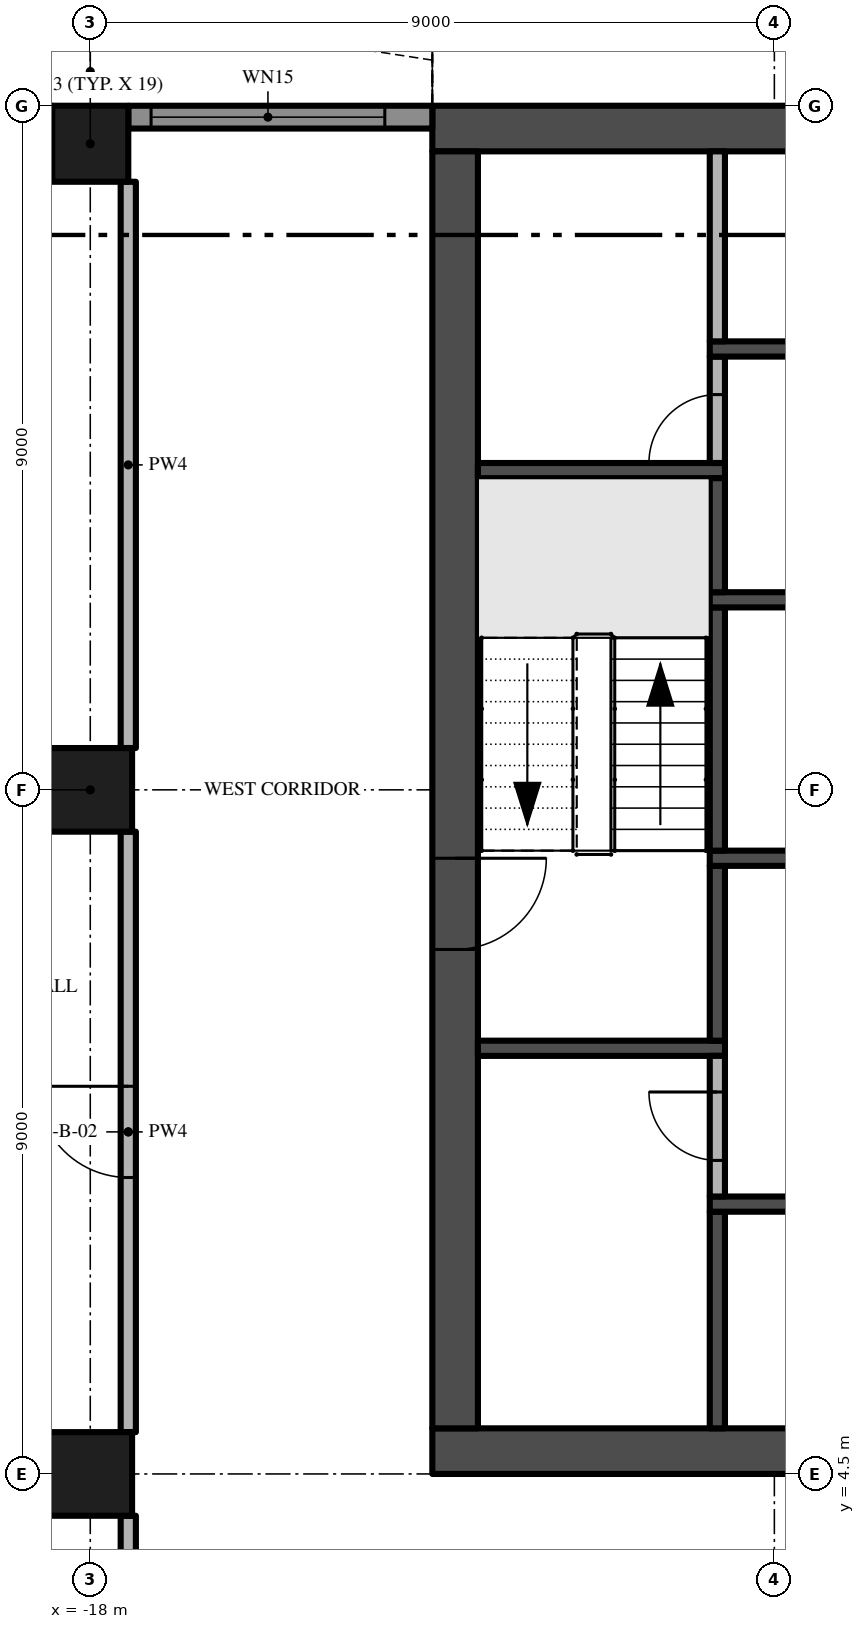
"""IFC4 building model, lengths in metres.
Left out: names, types, materials, properties, quantities, classifications, styles, units other than length and angle.
Written with IfcOpenShell. Run it as: python <this file> out.ifc"""

import sys

from ifc_helpers import new_model, si_unit, direction, frame, frame_2d, origin, origin_2d, place, context, subcontext, project, spatial, polyline, rectangle, outline, extrude, element, fill, save


model = new_model("IFC4")
c1 = context("Model", 3, precision=1e-05, world=origin(), true_north=direction((0.0, 1.0)))
c2 = subcontext(c1, "Body", "Model", "MODEL_VIEW")
j1 = project(units=[si_unit("LENGTHUNIT", "METRE"), si_unit("PLANEANGLEUNIT", "RADIAN")], contexts=[c1])
p1 = place(None, origin())
s1 = spatial("IfcSite", under=j1, at=p1, CompositionType="ELEMENT")
p2 = place(p1, origin())
s2 = spatial("IfcBuilding", under=s1, at=p2, CompositionType="ELEMENT")
p3 = place(p2, frame((0.0, 0.0, 203.4)))
s3 = spatial("IfcBuildingStorey", under=s2, at=p3, CompositionType="ELEMENT", Elevation=203.4)
p4 = place(p3, frame((-13.5, 4.8, -0.3), z_axis=(0.0, 0.0, 1.0), x_axis=(1.0, 0.0, 0.0)))
e1 = element("IfcWall", 1, at=p4, inside=s3, PredefinedType="SHEAR", context=c2, shape_type="SweptSolid", body=[
    extrude(rectangle(XDim=27.0, YDim=0.6, at=frame_2d((13.5, 0.0))), origin(), (0.0, 0.0, 1.0), 3.8),
])
p5 = place(p4, frame((12.0, 0.0, 0.3)))
e2 = element("IfcOpeningElement", 2, at=p5, cuts=e1, PredefinedType="OPENING", context=c2, shape_type="SweptSolid", body=[
    extrude(rectangle(XDim=3.0, YDim=2.4, at=frame_2d((1.5, 1.2))), frame((0.0, 0.31, 0.0), z_axis=(0.0, -1.0, 0.0), x_axis=(1.0, 0.0, 0.0)), (0.0, 0.0, 1.0), 0.62),
])
p6 = place(p4, frame((4.9, 0.0, 0.3)))
e3 = element("IfcOpeningElement", 3, at=p6, cuts=e1, PredefinedType="OPENING", context=c2, shape_type="SweptSolid", body=[
    extrude(rectangle(XDim=1.2, YDim=2.2, at=frame_2d((0.6, 1.1))), frame((0.0, 0.31, 0.0), z_axis=(0.0, -1.0, 0.0), x_axis=(1.0, 0.0, 0.0)), (0.0, 0.0, 1.0), 0.62),
])
p7 = place(p4, frame((20.75, 0.0, 0.3)))
e4 = element("IfcOpeningElement", 4, at=p7, cuts=e1, PredefinedType="OPENING", context=c2, shape_type="SweptSolid", body=[
    extrude(rectangle(XDim=1.5, YDim=2.2, at=frame_2d((0.75, 1.1))), frame((0.0, 0.31, 0.0), z_axis=(0.0, -1.0, 0.0), x_axis=(1.0, 0.0, 0.0)), (0.0, 0.0, 1.0), 0.62),
])
p8 = place(p4, frame((17.4, 0.0, 0.3)))
e5 = element("IfcOpeningElement", 5, at=p8, cuts=e1, PredefinedType="OPENING", context=c2, shape_type="SweptSolid", body=[
    extrude(rectangle(XDim=1.2, YDim=2.2, at=frame_2d((0.6, 1.1))), frame((0.0, 0.31, 0.0), z_axis=(0.0, -1.0, 0.0), x_axis=(1.0, 0.0, 0.0)), (0.0, 0.0, 1.0), 0.62),
])
p9 = place(p3, frame((13.5, 22.2, -0.3), z_axis=(0.0, 0.0, 1.0), x_axis=(-1.0, 0.0, 0.0)))
e6 = element("IfcWall", 6, at=p9, inside=s3, PredefinedType="SHEAR", context=c2, shape_type="SweptSolid", body=[
    extrude(rectangle(XDim=27.0, YDim=0.6, at=frame_2d((13.5, 0.0))), origin(), (0.0, 0.0, 1.0), 3.8),
])
p10 = place(p3, frame((-13.2, 21.9, -0.3), z_axis=(0.0, 0.0, 1.0), x_axis=(0.0, -1.0, 0.0)))
e7 = element("IfcWall", 7, at=p10, inside=s3, PredefinedType="SHEAR", context=c2, shape_type="SweptSolid", body=[
    extrude(rectangle(XDim=16.8, YDim=0.6, at=frame_2d((8.4, 0.0))), origin(), (0.0, 0.0, 1.0), 3.8),
])
p11 = place(p10, frame((9.3, 0.0, 0.3)))
e8 = element("IfcOpeningElement", 8, at=p11, cuts=e7, PredefinedType="OPENING", context=c2, shape_type="SweptSolid", body=[
    extrude(rectangle(XDim=1.2, YDim=2.2, at=frame_2d((0.6, 1.1))), frame((0.0, 0.31, 0.0), z_axis=(0.0, -1.0, 0.0), x_axis=(1.0, 0.0, 0.0)), (0.0, 0.0, 1.0), 0.62),
])
p12 = place(p3, frame((-18.0, 13.5, 0.0), z_axis=(0.0, 0.0, 1.0), x_axis=(1.0, 0.0, 0.0)))
e9 = element("IfcColumn", 9, at=p12, inside=s3, PredefinedType="COLUMN", context=c2, shape_type="SweptSolid", body=[
    extrude(rectangle(XDim=1.1, YDim=1.1, at=origin_2d()), origin(), (0.0, 0.0, 1.0), 3.5),
])
p13 = place(p3, frame((-18.0, 22.0, 0.0), z_axis=(0.0, 0.0, 1.0), x_axis=(1.0, 0.0, 0.0)))
e10 = element("IfcColumn", 10, at=p13, inside=s3, PredefinedType="COLUMN", context=c2, shape_type="SweptSolid", body=[
    extrude(rectangle(XDim=1.0, YDim=1.0, at=origin_2d()), origin(), (0.0, 0.0, 1.0), 3.5),
])
p14 = place(p3, frame((-18.0, 4.5, 0.0), z_axis=(0.0, 0.0, 1.0), x_axis=(1.0, 0.0, 0.0)))
e11 = element("IfcColumn", 11, at=p14, inside=s3, PredefinedType="COLUMN", context=c2, shape_type="SweptSolid", body=[
    extrude(rectangle(XDim=1.1, YDim=1.1, at=origin_2d()), origin(), (0.0, 0.0, 1.0), 3.5),
])
p15 = place(p3, frame((-17.5, 22.35, 0.0), z_axis=(0.0, 0.0, 1.0), x_axis=(1.0, 0.0, 0.0)))
e12 = element("IfcWall", 12, at=p15, inside=s3, PredefinedType="SOLIDWALL", context=c2, shape_type="SweptSolid", body=[
    extrude(rectangle(XDim=4.0, YDim=0.3, at=frame_2d((2.0, 0.0))), origin(), (0.0, 0.0, 1.0), 3.5),
])
p16 = place(p15, frame((0.3, 0.0, 0.45)))
e13 = element("IfcOpeningElement", 13, at=p16, cuts=e12, PredefinedType="OPENING", context=c2, shape_type="SweptSolid", body=[
    extrude(rectangle(XDim=3.075, YDim=2.65, at=frame_2d((1.538, 1.325))), frame((0.0, 0.16, 0.0), z_axis=(0.0, -1.0, 0.0), x_axis=(1.0, 0.0, 0.0)), (0.0, 0.0, 1.0), 0.32),
])
p17 = place(p3, origin())
e14 = element("IfcWall", 14, at=p17, inside=s3, PredefinedType="USERDEFINED", context=c2, shape_type="SweptSolid", body=[
    extrude(outline(polyline([(-13.5, 23.1), (-15.0, 23.329), (-16.5, 23.929), (-18.0, 24.671), (-19.5, 25.271), (-21.0, 25.5), (-22.5, 25.271), (-22.462, 25.024), (-21.0, 25.247), (-19.566, 25.028), (-18.102, 24.442), (-16.602, 23.701), (-15.066, 23.086), (-13.538, 22.853), (-13.5, 23.1)])), origin(), (0.0, 0.0, 1.0), 0.9),
])
for number, where, z_axis, x_axis in (
    (15, (-12.9, 10.1, 0.0), (0.0, 0.0, 1.0), (1.0, 0.0, 0.0)),
    (16, (-12.9, 17.7, 0.0), (0.0, 0.0, 1.0), (1.0, 0.0, 0.0)),
):
    element("IfcWall", number, at=place(p3, frame(where, z_axis=z_axis, x_axis=x_axis)), inside=s3, PredefinedType="SHEAR", context=c2, shape_type="SweptSolid", body=[
        extrude(rectangle(XDim=3.25, YDim=0.2, at=frame_2d((1.625, 0.0))), origin(), (0.0, 0.0, 1.0), 3.5),
    ])
p18 = place(p3, frame((-9.75, 5.1, 0.0), z_axis=(0.0, 0.0, 1.0), x_axis=(0.0, 1.0, 0.0)))
e17 = element("IfcWall", 17, at=p18, inside=s3, PredefinedType="SHEAR", context=c2, shape_type="SweptSolid", body=[
    extrude(rectangle(XDim=2.85, YDim=0.2, at=frame_2d((1.425, 0.0))), origin(), (0.0, 0.0, 1.0), 3.5),
])
p19 = place(p3, frame((-9.85, 8.05, 0.0), z_axis=(0.0, 0.0, 1.0), x_axis=(1.0, 0.0, 0.0)))
e18 = element("IfcWall", 18, at=p19, inside=s3, PredefinedType="SHEAR", context=c2, shape_type="SweptSolid", body=[
    extrude(rectangle(XDim=8.35, YDim=0.2, at=frame_2d((4.175, 0.0))), origin(), (0.0, 0.0, 1.0), 3.5),
])
p20 = place(p3, frame((-9.75, 8.15, 0.0), z_axis=(0.0, 0.0, 1.0), x_axis=(0.0, 1.0, 0.0)))
e19 = element("IfcWall", 19, at=p20, inside=s3, PredefinedType="PARTITIONING", context=c2, shape_type="SweptSolid", body=[
    extrude(rectangle(XDim=1.85, YDim=0.2, at=frame_2d((0.925, 0.0))), origin(), (0.0, 0.0, 1.0), 3.5),
])
p21 = place(p20, frame((0.475, 0.0, 0.0)))
e20 = element("IfcOpeningElement", 20, at=p21, cuts=e19, PredefinedType="OPENING", context=c2, shape_type="SweptSolid", body=[
    extrude(rectangle(XDim=0.9, YDim=2.1, at=frame_2d((0.45, 1.05))), frame((0.0, 0.11, 0.0), z_axis=(0.0, -1.0, 0.0), x_axis=(1.0, 0.0, 0.0)), (0.0, 0.0, 1.0), 0.22),
])
p22 = place(p3, frame((-9.75, 10.2, 0.0), z_axis=(0.0, 0.0, 1.0), x_axis=(0.0, 1.0, 0.0)))
e21 = element("IfcWall", 21, at=p22, inside=s3, PredefinedType="SHEAR", context=c2, shape_type="SweptSolid", body=[
    extrude(rectangle(XDim=2.3, YDim=0.2, at=frame_2d((1.15, 0.0))), origin(), (0.0, 0.0, 1.0), 3.5),
])
p23 = place(p3, frame((-9.85, 12.6, 0.0), z_axis=(0.0, 0.0, 1.0), x_axis=(1.0, 0.0, 0.0)))
e22 = element("IfcWall", 22, at=p23, inside=s3, PredefinedType="SHEAR", context=c2, shape_type="SweptSolid", body=[
    extrude(rectangle(XDim=3.475, YDim=0.2, at=frame_2d((1.738, 0.0))), origin(), (0.0, 0.0, 1.0), 3.5),
])
p24 = place(p3, frame((-9.75, 12.7, 0.0), z_axis=(0.0, 0.0, 1.0), x_axis=(0.0, 1.0, 0.0)))
e23 = element("IfcWall", 23, at=p24, inside=s3, PredefinedType="SHEAR", context=c2, shape_type="SweptSolid", body=[
    extrude(rectangle(XDim=3.2, YDim=0.2, at=frame_2d((1.6, 0.0))), origin(), (0.0, 0.0, 1.0), 3.5),
])
p25 = place(p3, frame((-1.5, 16.0, 0.0), z_axis=(0.0, 0.0, 1.0), x_axis=(-1.0, 0.0, 0.0)))
e24 = element("IfcWall", 24, at=p25, inside=s3, PredefinedType="SHEAR", context=c2, shape_type="SweptSolid", body=[
    extrude(rectangle(XDim=8.35, YDim=0.2, at=frame_2d((4.175, 0.0))), origin(), (0.0, 0.0, 1.0), 3.5),
])
p26 = place(p25, frame((6.162, 0.0, 0.0)))
e25 = element("IfcOpeningElement", 25, at=p26, cuts=e24, PredefinedType="OPENING", context=c2, shape_type="SweptSolid", body=[
    extrude(rectangle(XDim=0.9, YDim=2.1, at=frame_2d((0.45, 1.05))), frame((0.0, 0.11, 0.0), z_axis=(0.0, -1.0, 0.0), x_axis=(1.0, 0.0, 0.0)), (0.0, 0.0, 1.0), 0.22),
])
p27 = place(p3, frame((-9.75, 16.1, 0.0), z_axis=(0.0, 0.0, 1.0), x_axis=(0.0, 1.0, 0.0)))
e26 = element("IfcWall", 26, at=p27, inside=s3, PredefinedType="SHEAR", context=c2, shape_type="SweptSolid", body=[
    extrude(rectangle(XDim=1.5, YDim=0.2, at=frame_2d((0.75, 0.0))), origin(), (0.0, 0.0, 1.0), 3.5),
])
p28 = place(p3, frame((-9.75, 17.8, 0.0), z_axis=(0.0, 0.0, 1.0), x_axis=(0.0, 1.0, 0.0)))
e27 = element("IfcWall", 27, at=p28, inside=s3, PredefinedType="PARTITIONING", context=c2, shape_type="SweptSolid", body=[
    extrude(rectangle(XDim=1.4, YDim=0.2, at=frame_2d((0.7, 0.0))), origin(), (0.0, 0.0, 1.0), 3.5),
])
p29 = place(p28, origin())
e28 = element("IfcOpeningElement", 28, at=p29, cuts=e27, PredefinedType="OPENING", context=c2, shape_type="SweptSolid", body=[
    extrude(rectangle(XDim=0.9, YDim=2.1, at=frame_2d((0.45, 1.05))), frame((0.0, 0.11, 0.0), z_axis=(0.0, -1.0, 0.0), x_axis=(1.0, 0.0, 0.0)), (0.0, 0.0, 1.0), 0.22),
])
p30 = place(p3, frame((-9.85, 19.3, 0.0), z_axis=(0.0, 0.0, 1.0), x_axis=(1.0, 0.0, 0.0)))
e29 = element("IfcWall", 29, at=p30, inside=s3, PredefinedType="SHEAR", context=c2, shape_type="SweptSolid", body=[
    extrude(rectangle(XDim=19.7, YDim=0.2, at=frame_2d((9.85, 0.0))), origin(), (0.0, 0.0, 1.0), 3.5),
])
p31 = place(p30, frame((10.519, 0.0, 0.0)))
e30 = element("IfcOpeningElement", 30, at=p31, cuts=e29, PredefinedType="OPENING", context=c2, shape_type="SweptSolid", body=[
    extrude(rectangle(XDim=1.1, YDim=2.1, at=frame_2d((0.55, 1.05))), frame((0.0, 0.11, 0.0), z_axis=(0.0, -1.0, 0.0), x_axis=(1.0, 0.0, 0.0)), (0.0, 0.0, 1.0), 0.22),
])
p32 = place(p30, frame((12.956, 0.0, 0.0)))
e31 = element("IfcOpeningElement", 31, at=p32, cuts=e29, PredefinedType="OPENING", context=c2, shape_type="SweptSolid", body=[
    extrude(rectangle(XDim=1.1, YDim=2.1, at=frame_2d((0.55, 1.05))), frame((0.0, 0.11, 0.0), z_axis=(0.0, -1.0, 0.0), x_axis=(1.0, 0.0, 0.0)), (0.0, 0.0, 1.0), 0.22),
])
p33 = place(p30, frame((15.394, 0.0, 0.0)))
e32 = element("IfcOpeningElement", 32, at=p33, cuts=e29, PredefinedType="OPENING", context=c2, shape_type="SweptSolid", body=[
    extrude(rectangle(XDim=1.1, YDim=2.1, at=frame_2d((0.55, 1.05))), frame((0.0, 0.11, 0.0), z_axis=(0.0, -1.0, 0.0), x_axis=(1.0, 0.0, 0.0)), (0.0, 0.0, 1.0), 0.22),
])
p34 = place(p30, frame((17.831, 0.0, 0.0)))
e33 = element("IfcOpeningElement", 33, at=p34, cuts=e29, PredefinedType="OPENING", context=c2, shape_type="SweptSolid", body=[
    extrude(rectangle(XDim=1.1, YDim=2.1, at=frame_2d((0.55, 1.05))), frame((0.0, 0.11, 0.0), z_axis=(0.0, -1.0, 0.0), x_axis=(1.0, 0.0, 0.0)), (0.0, 0.0, 1.0), 0.22),
])
p35 = place(p30, frame((2.087, 0.0, 0.0)))
e34 = element("IfcOpeningElement", 34, at=p35, cuts=e29, PredefinedType="OPENING", context=c2, shape_type="SweptSolid", body=[
    extrude(rectangle(XDim=0.9, YDim=2.1, at=frame_2d((0.45, 1.05))), frame((0.0, 0.11, 0.0), z_axis=(0.0, -1.0, 0.0), x_axis=(1.0, 0.0, 0.0)), (0.0, 0.0, 1.0), 0.22),
])
p36 = place(p30, frame((6.963, 0.0, 0.0)))
e35 = element("IfcOpeningElement", 35, at=p36, cuts=e29, PredefinedType="OPENING", context=c2, shape_type="SweptSolid", body=[
    extrude(rectangle(XDim=0.9, YDim=2.1, at=frame_2d((0.45, 1.05))), frame((0.0, 0.11, 0.0), z_axis=(0.0, -1.0, 0.0), x_axis=(1.0, 0.0, 0.0)), (0.0, 0.0, 1.0), 0.22),
])
p37 = place(p3, frame((-9.75, 19.4, 0.0), z_axis=(0.0, 0.0, 1.0), x_axis=(0.0, 1.0, 0.0)))
e36 = element("IfcWall", 36, at=p37, inside=s3, PredefinedType="PARTITIONING", context=c2, shape_type="SweptSolid", body=[
    extrude(rectangle(XDim=2.5, YDim=0.2, at=frame_2d((1.25, 0.0))), origin(), (0.0, 0.0, 1.0), 3.5),
])
p38 = place(p3, frame((-17.5, -0.2, 0.0), z_axis=(0.0, 0.0, 1.0), x_axis=(0.0, 1.0, 0.0)))
e37 = element("IfcWall", 37, at=p38, inside=s3, PredefinedType="PARTITIONING", context=c2, shape_type="SweptSolid", body=[
    extrude(rectangle(XDim=4.15, YDim=0.2, at=frame_2d((2.075, 0.0))), origin(), (0.0, 0.0, 1.0), 3.5),
])
p39 = place(p3, frame((-17.5, 5.05, 0.0), z_axis=(0.0, 0.0, 1.0), x_axis=(0.0, 1.0, 0.0)))
e38 = element("IfcWall", 38, at=p39, inside=s3, PredefinedType="PARTITIONING", context=c2, shape_type="SweptSolid", body=[
    extrude(rectangle(XDim=7.9, YDim=0.2, at=frame_2d((3.95, 0.0))), origin(), (0.0, 0.0, 1.0), 3.5),
])
p40 = place(p39, frame((3.35, 0.0, 0.0)))
e39 = element("IfcOpeningElement", 39, at=p40, cuts=e38, PredefinedType="OPENING", context=c2, shape_type="SweptSolid", body=[
    extrude(rectangle(XDim=1.2, YDim=2.4, at=frame_2d((0.6, 1.2))), frame((0.0, 0.11, 0.0), z_axis=(0.0, -1.0, 0.0), x_axis=(1.0, 0.0, 0.0)), (0.0, 0.0, 1.0), 0.22),
])
p41 = place(p3, frame((-17.5, 14.05, 0.0), z_axis=(0.0, 0.0, 1.0), x_axis=(0.0, 1.0, 0.0)))
e40 = element("IfcWall", 40, at=p41, inside=s3, PredefinedType="PARTITIONING", context=c2, shape_type="SweptSolid", body=[
    extrude(rectangle(XDim=7.45, YDim=0.2, at=frame_2d((3.725, 0.0))), origin(), (0.0, 0.0, 1.0), 3.5),
])
p42 = place(p16, origin())
e41 = element("IfcWindow", 41, at=p42, inside=s3, PartitioningType="SINGLE_PANEL", PredefinedType="WINDOW", context=c2, shape_type="SweptSolid", body=[
    extrude(rectangle(XDim=3.075, YDim=2.65, at=frame_2d((1.538, 1.325))), frame((0.0, 0.03, 0.0), z_axis=(0.0, -1.0, 0.0), x_axis=(1.0, 0.0, 0.0)), (0.0, 0.0, 1.0), 0.06),
])
fill(e13, e41)
p43 = place(p11, frame((1.2, 0.0, 0.0), z_axis=(0.0, 0.0, 1.0), x_axis=(-1.0, 0.0, 0.0)))
e42 = element("IfcDoor", 42, at=p43, inside=s3, OperationType="SINGLE_SWING_RIGHT", PredefinedType="DOOR", context=c2, shape_type="SweptSolid", body=[
    extrude(rectangle(XDim=1.2, YDim=2.2, at=frame_2d((0.6, 1.1))), frame((0.0, 0.025, 0.0), z_axis=(0.0, -1.0, 0.0), x_axis=(1.0, 0.0, 0.0)), (0.0, 0.0, 1.0), 0.05),
])
fill(e8, e42)
p44 = place(p29, origin())
e43 = element("IfcDoor", 43, at=p44, inside=s3, OperationType="SINGLE_SWING_LEFT", PredefinedType="DOOR", context=c2, shape_type="SweptSolid", body=[
    extrude(rectangle(XDim=0.9, YDim=2.1, at=frame_2d((0.45, 1.05))), frame((0.0, 0.025, 0.0), z_axis=(0.0, -1.0, 0.0), x_axis=(1.0, 0.0, 0.0)), (0.0, 0.0, 1.0), 0.05),
])
fill(e28, e43)
p45 = place(p21, origin())
e44 = element("IfcDoor", 44, at=p45, inside=s3, OperationType="SINGLE_SWING_RIGHT", PredefinedType="DOOR", context=c2, shape_type="SweptSolid", body=[
    extrude(rectangle(XDim=0.9, YDim=2.1, at=frame_2d((0.45, 1.05))), frame((0.0, 0.025, 0.0), z_axis=(0.0, -1.0, 0.0), x_axis=(1.0, 0.0, 0.0)), (0.0, 0.0, 1.0), 0.05),
])
fill(e20, e44)
p46 = place(p40, origin())
e45 = element("IfcDoor", 45, at=p46, inside=s3, OperationType="SINGLE_SWING_RIGHT", PredefinedType="DOOR", context=c2, shape_type="SweptSolid", body=[
    extrude(rectangle(XDim=1.2, YDim=2.4, at=frame_2d((0.6, 1.2))), frame((0.0, 0.025, 0.0), z_axis=(0.0, -1.0, 0.0), x_axis=(1.0, 0.0, 0.0)), (0.0, 0.0, 1.0), 0.05),
])
fill(e39, e45)
save(model, sys.argv[1])
